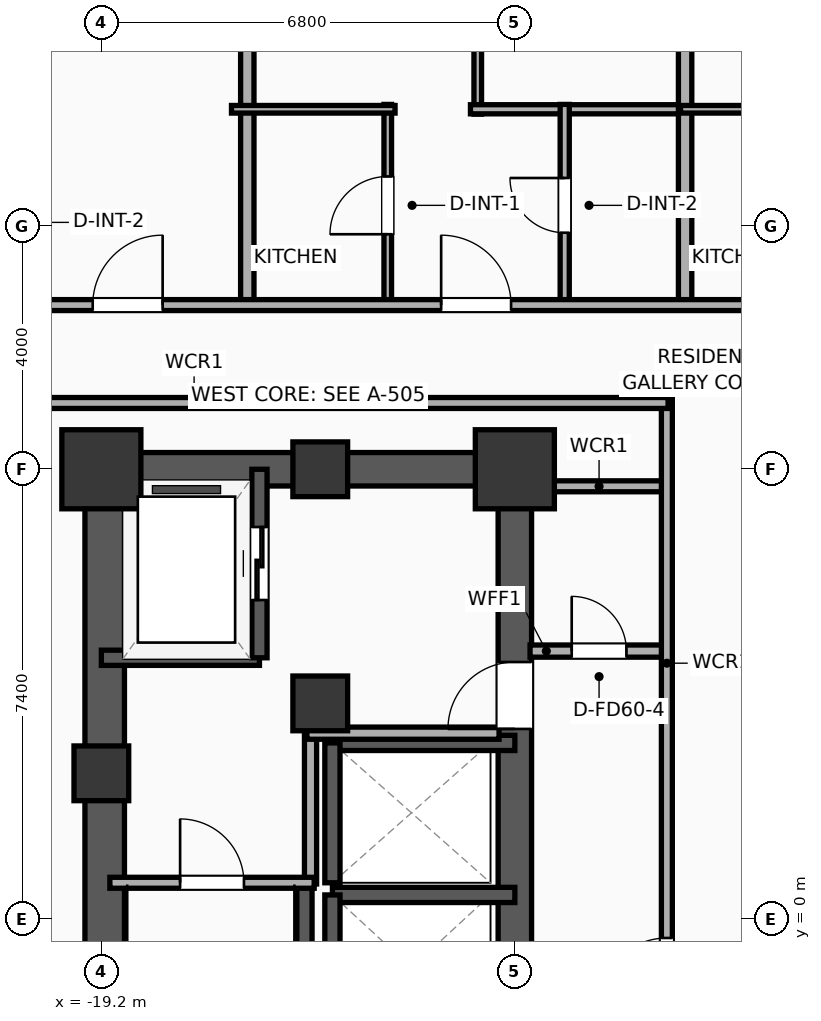
"""IFC4 building model, lengths in metres.
Left out: names, types, materials, properties, quantities, classifications, styles, units other than length and angle.
Written with IfcOpenShell. Run it as: python <this file> out.ifc"""

import sys

from ifc_helpers import new_model, si_unit, direction, frame, frame_2d, origin, origin_2d, place, context, subcontext, project, spatial, rectangle, extrude, element, fill, save


model = new_model("IFC4")
c1 = context("Model", 3, precision=1e-05, world=origin(), true_north=direction((0.0, 1.0)))
c2 = subcontext(c1, "Body", "Model", "MODEL_VIEW")
j1 = project(units=[si_unit("LENGTHUNIT", "METRE"), si_unit("PLANEANGLEUNIT", "RADIAN")], contexts=[c1])
p1 = place(None, origin())
s1 = spatial("IfcSite", under=j1, at=p1, CompositionType="ELEMENT")
p2 = place(p1, origin())
s2 = spatial("IfcBuilding", under=s1, at=p2, CompositionType="ELEMENT")
p3 = place(p2, frame((0.0, 0.0, 136.5)))
s3 = spatial("IfcBuildingStorey", under=s2, at=p3, CompositionType="ELEMENT", Elevation=136.5)
p4 = place(p3, frame((-19.2, 2.4, 0.0), z_axis=(0.0, 0.0, 1.0), x_axis=(1.0, 0.0, 0.0)))
e1 = element("IfcColumn", 1, at=p4, inside=s3, PredefinedType="COLUMN", context=c2, shape_type="SweptSolid", body=[
    extrude(rectangle(XDim=0.9, YDim=0.9, at=origin_2d()), origin(), (0.0, 0.0, 1.0), 3.9),
])
p5 = place(p3, frame((-19.2, 7.4, 0.0), z_axis=(0.0, 0.0, 1.0), x_axis=(1.0, 0.0, 0.0)))
e2 = element("IfcColumn", 2, at=p5, inside=s3, PredefinedType="COLUMN", context=c2, shape_type="SweptSolid", body=[
    extrude(rectangle(XDim=1.3, YDim=1.3, at=origin_2d()), origin(), (0.0, 0.0, 1.0), 3.9),
])
for number, where, z_axis, x_axis in (
    (3, (-15.6, 7.4, 0.0), (0.0, 0.0, 1.0), (1.0, 0.0, 0.0)),
    (4, (-15.6, 3.55, 0.0), (0.0, 0.0, 1.0), (1.0, 0.0, 0.0)),
):
    element("IfcColumn", number, at=place(p3, frame(where, z_axis=z_axis, x_axis=x_axis)), inside=s3, PredefinedType="COLUMN", context=c2, shape_type="SweptSolid", body=[
        extrude(rectangle(XDim=0.9, YDim=0.9, at=origin_2d()), origin(), (0.0, 0.0, 1.0), 3.9),
    ])
p6 = place(p3, frame((-12.4, 7.4, 0.0), z_axis=(0.0, 0.0, 1.0), x_axis=(1.0, 0.0, 0.0)))
e5 = element("IfcColumn", 5, at=p6, inside=s3, PredefinedType="COLUMN", context=c2, shape_type="SweptSolid", body=[
    extrude(rectangle(XDim=1.3, YDim=1.3, at=origin_2d()), origin(), (0.0, 0.0, 1.0), 3.9),
])
p7 = place(p3, frame((-19.475, 7.4, 0.0), z_axis=(0.0, 0.0, 1.0), x_axis=(1.0, 0.0, 0.0)))
e6 = element("IfcWall", 6, at=p7, inside=s3, PredefinedType="SHEAR", context=c2, shape_type="SweptSolid", body=[
    extrude(rectangle(XDim=7.35, YDim=0.55, at=frame_2d((3.675, 0.0))), origin(), (0.0, 0.0, 1.0), 3.5),
])
p8 = place(p3, frame((-19.145, -7.4, 0.0), z_axis=(0.0, 0.0, 1.0), x_axis=(0.0, 1.0, 0.0)))
e7 = element("IfcWall", 7, at=p8, inside=s3, PredefinedType="SHEAR", context=c2, shape_type="SweptSolid", body=[
    extrude(rectangle(XDim=14.8, YDim=0.65, at=frame_2d((7.4, 0.0))), origin(), (0.0, 0.0, 1.0), 3.5),
])
p9 = place(p3, frame((-12.4, -7.4, 0.0), z_axis=(0.0, 0.0, 1.0), x_axis=(0.0, 1.0, 0.0)))
e8 = element("IfcWall", 8, at=p9, inside=s3, PredefinedType="SHEAR", context=c2, shape_type="SweptSolid", body=[
    extrude(rectangle(XDim=14.8, YDim=0.55, at=frame_2d((7.4, 0.0))), origin(), (0.0, 0.0, 1.0), 3.5),
])
p10 = place(p9, frame((0.85, 0.0, 0.0)))
e9 = element("IfcOpeningElement", 9, at=p10, cuts=e8, PredefinedType="OPENING", context=c2, shape_type="SweptSolid", body=[
    extrude(rectangle(XDim=1.1, YDim=2.05, at=frame_2d((0.55, 1.025))), frame((0.0, 0.285, 0.0), z_axis=(0.0, -1.0, 0.0), x_axis=(1.0, 0.0, 0.0)), (0.0, 0.0, 1.0), 0.57),
])
p11 = place(p9, frame((3.45, 0.0, 0.0)))
e10 = element("IfcOpeningElement", 10, at=p11, cuts=e8, PredefinedType="OPENING", context=c2, shape_type="SweptSolid", body=[
    extrude(rectangle(XDim=1.1, YDim=2.05, at=frame_2d((0.55, 1.025))), frame((0.0, 0.285, 0.0), z_axis=(0.0, -1.0, 0.0), x_axis=(1.0, 0.0, 0.0)), (0.0, 0.0, 1.0), 0.57),
])
p12 = place(p9, frame((10.53, 0.0, 0.0)))
e11 = element("IfcOpeningElement", 11, at=p12, cuts=e8, PredefinedType="OPENING", context=c2, shape_type="SweptSolid", body=[
    extrude(rectangle(XDim=1.1, YDim=2.05, at=frame_2d((0.55, 1.025))), frame((0.0, 0.285, 0.0), z_axis=(0.0, -1.0, 0.0), x_axis=(1.0, 0.0, 0.0)), (0.0, 0.0, 1.0), 0.57),
])
p13 = place(p3, frame((-15.86, -7.085, 0.0), z_axis=(0.0, 0.0, 1.0), x_axis=(0.0, 1.0, 0.0)))
e12 = element("IfcWall", 12, at=p13, inside=s3, PredefinedType="SOLIDWALL", context=c2, shape_type="SweptSolid", body=[
    extrude(rectangle(XDim=7.685, YDim=0.25, at=frame_2d((3.843, 0.0))), origin(), (0.0, 0.0, 1.0), 3.5),
])
p14 = place(p3, frame((-19.2, 4.3, 0.0), z_axis=(0.0, 0.0, 1.0), x_axis=(1.0, 0.0, 0.0)))
e13 = element("IfcWall", 13, at=p14, inside=s3, PredefinedType="SOLIDWALL", context=c2, shape_type="SweptSolid", body=[
    extrude(rectangle(XDim=2.6, YDim=0.25, at=frame_2d((1.3, 0.0))), origin(), (0.0, 0.0, 1.0), 3.5),
])
p15 = place(p3, frame((-16.6, 4.3, 0.0), z_axis=(0.0, 0.0, 1.0), x_axis=(0.0, 1.0, 0.0)))
e14 = element("IfcWall", 14, at=p15, inside=s3, PredefinedType="SOLIDWALL", context=c2, shape_type="SweptSolid", body=[
    extrude(rectangle(XDim=3.1, YDim=0.25, at=frame_2d((1.55, 0.0))), origin(), (0.0, 0.0, 1.0), 3.5),
])
p16 = place(p15, frame((0.95, 0.0, 0.0)))
e15 = element("IfcOpeningElement", 15, at=p16, cuts=e14, PredefinedType="OPENING", context=c2, shape_type="SweptSolid", body=[
    extrude(rectangle(XDim=1.2, YDim=2.05, at=frame_2d((0.6, 1.025))), frame((0.0, 0.135, 0.0), z_axis=(0.0, -1.0, 0.0), x_axis=(1.0, 0.0, 0.0)), (0.0, 0.0, 1.0), 0.27),
])
p17 = place(p3, frame((-12.4, 0.4, 0.0), z_axis=(0.0, 0.0, 1.0), x_axis=(-1.0, 0.0, 0.0)))
e16 = element("IfcWall", 16, at=p17, inside=s3, PredefinedType="SOLIDWALL", context=c2, shape_type="SweptSolid", body=[
    extrude(rectangle(XDim=3.0, YDim=0.25, at=frame_2d((1.5, 0.0))), origin(), (0.0, 0.0, 1.0), 3.5),
])
p18 = place(p3, frame((-15.4, 0.4, 0.0), z_axis=(0.0, 0.0, 1.0), x_axis=(0.0, -1.0, 0.0)))
e17 = element("IfcWall", 17, at=p18, inside=s3, PredefinedType="SOLIDWALL", context=c2, shape_type="SweptSolid", body=[
    extrude(rectangle(XDim=2.4, YDim=0.25, at=frame_2d((1.2, 0.0))), origin(), (0.0, 0.0, 1.0), 3.5),
])
p19 = place(p3, frame((-12.4, 2.9, 0.0), z_axis=(0.0, 0.0, 1.0), x_axis=(-1.0, 0.0, 0.0)))
e18 = element("IfcWall", 18, at=p19, inside=s3, PredefinedType="SOLIDWALL", context=c2, shape_type="SweptSolid", body=[
    extrude(rectangle(XDim=3.0, YDim=0.25, at=frame_2d((1.5, 0.0))), origin(), (0.0, 0.0, 1.0), 3.5),
])
p20 = place(p3, frame((-15.4, 2.9, 0.0), z_axis=(0.0, 0.0, 1.0), x_axis=(0.0, -1.0, 0.0)))
e19 = element("IfcWall", 19, at=p20, inside=s3, PredefinedType="SOLIDWALL", context=c2, shape_type="SweptSolid", body=[
    extrude(rectangle(XDim=2.3, YDim=0.25, at=frame_2d((1.15, 0.0))), origin(), (0.0, 0.0, 1.0), 3.5),
])
p21 = place(p3, frame((-15.76, 0.58, 0.0), z_axis=(0.0, 0.0, 1.0), x_axis=(0.0, 1.0, 0.0)))
e20 = element("IfcWall", 20, at=p21, inside=s3, PredefinedType="PARTITIONING", context=c2, shape_type="SweptSolid", body=[
    extrude(rectangle(XDim=2.52, YDim=0.2, at=frame_2d((1.26, 0.0))), origin(), (0.0, 0.0, 1.0), 3.5),
])
p22 = place(p3, frame((-15.82, 3.06, 0.0), z_axis=(0.0, 0.0, 1.0), x_axis=(1.0, 0.0, 0.0)))
e21 = element("IfcWall", 21, at=p22, inside=s3, PredefinedType="PARTITIONING", context=c2, shape_type="SweptSolid", body=[
    extrude(rectangle(XDim=3.16, YDim=0.2, at=frame_2d((1.58, 0.0))), origin(), (0.0, 0.0, 1.0), 3.5),
])
p23 = place(p3, frame((-19.06, 0.6, 0.0), z_axis=(0.0, 0.0, 1.0), x_axis=(1.0, 0.0, 0.0)))
e22 = element("IfcWall", 22, at=p23, inside=s3, PredefinedType="PARTITIONING", context=c2, shape_type="SweptSolid", body=[
    extrude(rectangle(XDim=3.36, YDim=0.18, at=frame_2d((1.68, 0.0))), origin(), (0.0, 0.0, 1.0), 3.5),
])
p24 = place(p23, frame((1.155, 0.0, 0.0)))
e23 = element("IfcOpeningElement", 23, at=p24, cuts=e22, PredefinedType="OPENING", context=c2, shape_type="SweptSolid", body=[
    extrude(rectangle(XDim=1.05, YDim=2.05, at=frame_2d((0.525, 1.025))), frame((0.0, 0.1, 0.0), z_axis=(0.0, -1.0, 0.0), x_axis=(1.0, 0.0, 0.0)), (0.0, 0.0, 1.0), 0.2),
])
p25 = place(p3, frame((-12.15, 4.41, 0.0), z_axis=(0.0, 0.0, 1.0), x_axis=(1.0, 0.0, 0.0)))
e24 = element("IfcWall", 24, at=p25, inside=s3, PredefinedType="PARTITIONING", context=c2, shape_type="SweptSolid", body=[
    extrude(rectangle(XDim=2.27, YDim=0.2, at=frame_2d((1.135, 0.0))), origin(), (0.0, 0.0, 1.0), 3.5),
])
p26 = place(p25, frame((0.685, 0.0, 0.0)))
e25 = element("IfcOpeningElement", 25, at=p26, cuts=e24, PredefinedType="OPENING", context=c2, shape_type="SweptSolid", body=[
    extrude(rectangle(XDim=0.9, YDim=2.05, at=frame_2d((0.45, 1.025))), frame((0.0, 0.11, 0.0), z_axis=(0.0, -1.0, 0.0), x_axis=(1.0, 0.0, 0.0)), (0.0, 0.0, 1.0), 0.22),
])
p27 = place(p3, frame((-12.15, 7.12, 0.0), z_axis=(0.0, 0.0, 1.0), x_axis=(1.0, 0.0, 0.0)))
e26 = element("IfcWall", 26, at=p27, inside=s3, PredefinedType="PARTITIONING", context=c2, shape_type="SweptSolid", body=[
    extrude(rectangle(XDim=2.27, YDim=0.18, at=frame_2d((1.135, 0.0))), origin(), (0.0, 0.0, 1.0), 2.54),
])
p28 = place(p3, frame((-9.9, -8.58, 0.0), z_axis=(0.0, 0.0, 1.0), x_axis=(0.0, 1.0, 0.0)))
e27 = element("IfcWall", 27, at=p28, inside=s3, PredefinedType="PARTITIONING", context=c2, shape_type="SweptSolid", body=[
    extrude(rectangle(XDim=17.16, YDim=0.18, at=frame_2d((8.58, 0.0))), origin(), (0.0, 0.0, 1.0), 3.5),
])
p29 = place(p28, frame((7.172, 0.0, 0.0)))
e28 = element("IfcOpeningElement", 28, at=p29, cuts=e27, PredefinedType="OPENING", context=c2, shape_type="SweptSolid", body=[
    extrude(rectangle(XDim=1.1, YDim=2.05, at=frame_2d((0.55, 1.025))), frame((0.0, 0.1, 0.0), z_axis=(0.0, -1.0, 0.0), x_axis=(1.0, 0.0, 0.0)), (0.0, 0.0, 1.0), 0.2),
])
p30 = place(p3, frame((-29.21, 8.49, 0.0), z_axis=(0.0, 0.0, 1.0), x_axis=(1.0, 0.0, 0.0)))
e29 = element("IfcWall", 29, at=p30, inside=s3, PredefinedType="PARTITIONING", context=c2, shape_type="SweptSolid", body=[
    extrude(rectangle(XDim=19.33, YDim=0.18, at=frame_2d((9.665, 0.0))), origin(), (0.0, 0.0, 1.0), 2.39),
])
p31 = place(p30, frame((2.44, 0.0, 0.0)))
e30 = element("IfcOpeningElement", 30, at=p31, cuts=e29, PredefinedType="OPENING", context=c2, shape_type="SweptSolid", body=[
    extrude(rectangle(XDim=1.15, YDim=2.05, at=frame_2d((0.575, 1.025))), frame((0.0, 0.1, 0.0), z_axis=(0.0, -1.0, 0.0), x_axis=(1.0, 0.0, 0.0)), (0.0, 0.0, 1.0), 0.2),
])
p32 = place(p3, frame((-16.8, 10.02, 0.0), z_axis=(0.0, 0.0, 1.0), x_axis=(0.0, 1.0, 0.0)))
e31 = element("IfcWall", 31, at=p32, inside=s3, PredefinedType="PARTITIONING", context=c2, shape_type="SweptSolid", body=[
    extrude(rectangle(XDim=11.59, YDim=0.22, at=frame_2d((5.795, 0.0))), origin(), (0.0, 0.0, 1.0), 3.5),
])
p33 = place(p3, frame((-13.01, 13.24, 0.0), z_axis=(0.0, 0.0, 1.0), x_axis=(0.0, 1.0, 0.0)))
e32 = element("IfcWall", 32, at=p33, inside=s3, PredefinedType="PARTITIONING", context=c2, shape_type="SweptSolid", body=[
    extrude(rectangle(XDim=8.52, YDim=0.125, at=frame_2d((4.26, 0.0))), origin(), (0.0, 0.0, 1.0), 3.5),
])
p34 = place(p33, frame((1.595, 0.0, 0.0)))
e33 = element("IfcOpeningElement", 33, at=p34, cuts=e32, PredefinedType="OPENING", context=c2, shape_type="SweptSolid", body=[
    extrude(rectangle(XDim=0.9, YDim=2.05, at=frame_2d((0.45, 1.025))), frame((0.0, 0.073, 0.0), z_axis=(0.0, -1.0, 0.0), x_axis=(1.0, 0.0, 0.0)), (0.0, 0.0, 1.0), 0.145),
])
p35 = place(p3, frame((-13.13, 13.32, 0.0), z_axis=(0.0, 0.0, 1.0), x_axis=(1.0, 0.0, 0.0)))
e34 = element("IfcWall", 34, at=p35, inside=s3, PredefinedType="PLUMBINGWALL", context=c2, shape_type="SweptSolid", body=[
    extrude(rectangle(XDim=3.605, YDim=0.15, at=frame_2d((1.802, 0.0))), origin(), (0.0, 0.0, 1.0), 3.5),
])
p36 = place(p3, frame((-14.49, 10.08, 0.0), z_axis=(0.0, 0.0, 1.0), x_axis=(0.0, 1.0, 0.0)))
e35 = element("IfcWall", 35, at=p36, inside=s3, PredefinedType="PARTITIONING", context=c2, shape_type="SweptSolid", body=[
    extrude(rectangle(XDim=3.32, YDim=0.125, at=frame_2d((1.66, 0.0))), origin(), (0.0, 0.0, 1.0), 3.5),
])
p37 = place(p36, frame((1.185, 0.0, 0.0)))
e36 = element("IfcOpeningElement", 36, at=p37, cuts=e35, PredefinedType="OPENING", context=c2, shape_type="SweptSolid", body=[
    extrude(rectangle(XDim=0.95, YDim=2.05, at=frame_2d((0.475, 1.025))), frame((0.0, 0.073, 0.0), z_axis=(0.0, -1.0, 0.0), x_axis=(1.0, 0.0, 0.0)), (0.0, 0.0, 1.0), 0.145),
])
p38 = place(p3, frame((-17.06, 13.32, 0.0), z_axis=(0.0, 0.0, 1.0), x_axis=(1.0, 0.0, 0.0)))
e37 = element("IfcWall", 37, at=p38, inside=s3, PredefinedType="PARTITIONING", context=c2, shape_type="SweptSolid", body=[
    extrude(rectangle(XDim=2.69, YDim=0.125, at=frame_2d((1.345, 0.0))), origin(), (0.0, 0.0, 1.0), 3.5),
])
p39 = place(p3, frame((-11.58, 10.08, 0.0), z_axis=(0.0, 0.0, 1.0), x_axis=(0.0, 1.0, 0.0)))
e38 = element("IfcWall", 38, at=p39, inside=s3, PredefinedType="PLUMBINGWALL", context=c2, shape_type="SweptSolid", body=[
    extrude(rectangle(XDim=3.32, YDim=0.15, at=frame_2d((1.66, 0.0))), origin(), (0.0, 0.0, 1.0), 2.39),
])
p40 = place(p39, frame((1.21, 0.0, 0.0)))
e39 = element("IfcOpeningElement", 39, at=p40, cuts=e38, PredefinedType="OPENING", context=c2, shape_type="SweptSolid", body=[
    extrude(rectangle(XDim=0.9, YDim=2.05, at=frame_2d((0.45, 1.025))), frame((0.0, 0.085, 0.0), z_axis=(0.0, -1.0, 0.0), x_axis=(1.0, 0.0, 0.0)), (0.0, 0.0, 1.0), 0.17),
])
p41 = place(p3, frame((-9.6, 10.02, 0.0), z_axis=(0.0, 0.0, 1.0), x_axis=(0.0, 1.0, 0.0)))
e40 = element("IfcWall", 40, at=p41, inside=s3, PredefinedType="PARTITIONING", context=c2, shape_type="SweptSolid", body=[
    extrude(rectangle(XDim=11.59, YDim=0.22, at=frame_2d((5.795, 0.0))), origin(), (0.0, 0.0, 1.0), 2.39),
])
p42 = place(p3, frame((-9.675, 13.32, 0.0), z_axis=(0.0, 0.0, 1.0), x_axis=(1.0, 0.0, 0.0)))
e41 = element("IfcWall", 41, at=p42, inside=s3, PredefinedType="PARTITIONING", context=c2, shape_type="SweptSolid", body=[
    extrude(rectangle(XDim=2.505, YDim=0.125, at=frame_2d((1.252, 0.0))), origin(), (0.0, 0.0, 1.0), 3.5),
])
p43 = place(p3, frame((-29.21, 10.1, 0.0), z_axis=(0.0, 0.0, 1.0), x_axis=(1.0, 0.0, 0.0)))
e42 = element("IfcWall", 42, at=p43, inside=s3, PredefinedType="PARTITIONING", context=c2, shape_type="SweptSolid", body=[
    extrude(rectangle(XDim=62.42, YDim=0.18, at=frame_2d((31.21, 0.0))), origin(), (0.0, 0.0, 1.0), 2.39),
])
p44 = place(p43, frame((2.74, 0.0, 0.0)))
e43 = element("IfcOpeningElement", 43, at=p44, cuts=e42, PredefinedType="OPENING", context=c2, shape_type="SweptSolid", body=[
    extrude(rectangle(XDim=0.9, YDim=2.05, at=frame_2d((0.45, 1.025))), frame((0.0, 0.1, 0.0), z_axis=(0.0, -1.0, 0.0), x_axis=(1.0, 0.0, 0.0)), (0.0, 0.0, 1.0), 0.2),
])
p45 = place(p43, frame((9.868, 0.0, 0.0)))
e44 = element("IfcOpeningElement", 44, at=p45, cuts=e42, PredefinedType="OPENING", context=c2, shape_type="SweptSolid", body=[
    extrude(rectangle(XDim=1.15, YDim=2.05, at=frame_2d((0.575, 1.025))), frame((0.0, 0.1, 0.0), z_axis=(0.0, -1.0, 0.0), x_axis=(1.0, 0.0, 0.0)), (0.0, 0.0, 1.0), 0.2),
])
p46 = place(p43, frame((15.598, 0.0, 0.0)))
e45 = element("IfcOpeningElement", 45, at=p46, cuts=e42, PredefinedType="OPENING", context=c2, shape_type="SweptSolid", body=[
    extrude(rectangle(XDim=1.15, YDim=2.05, at=frame_2d((0.575, 1.025))), frame((0.0, 0.1, 0.0), z_axis=(0.0, -1.0, 0.0), x_axis=(1.0, 0.0, 0.0)), (0.0, 0.0, 1.0), 0.2),
])
p47 = place(p43, frame((22.801, 0.0, 0.0)))
e46 = element("IfcOpeningElement", 46, at=p47, cuts=e42, PredefinedType="OPENING", context=c2, shape_type="SweptSolid", body=[
    extrude(rectangle(XDim=1.15, YDim=2.05, at=frame_2d((0.575, 1.025))), frame((0.0, 0.1, 0.0), z_axis=(0.0, -1.0, 0.0), x_axis=(1.0, 0.0, 0.0)), (0.0, 0.0, 1.0), 0.2),
])
p48 = place(p43, frame((29.998, 0.0, 0.0)))
e47 = element("IfcOpeningElement", 47, at=p48, cuts=e42, PredefinedType="OPENING", context=c2, shape_type="SweptSolid", body=[
    extrude(rectangle(XDim=1.15, YDim=2.05, at=frame_2d((0.575, 1.025))), frame((0.0, 0.1, 0.0), z_axis=(0.0, -1.0, 0.0), x_axis=(1.0, 0.0, 0.0)), (0.0, 0.0, 1.0), 0.2),
])
p49 = place(p43, frame((37.202, 0.0, 0.0)))
e48 = element("IfcOpeningElement", 48, at=p49, cuts=e42, PredefinedType="OPENING", context=c2, shape_type="SweptSolid", body=[
    extrude(rectangle(XDim=1.15, YDim=2.05, at=frame_2d((0.575, 1.025))), frame((0.0, 0.1, 0.0), z_axis=(0.0, -1.0, 0.0), x_axis=(1.0, 0.0, 0.0)), (0.0, 0.0, 1.0), 0.2),
])
p50 = place(p43, frame((44.399, 0.0, 0.0)))
e49 = element("IfcOpeningElement", 49, at=p50, cuts=e42, PredefinedType="OPENING", context=c2, shape_type="SweptSolid", body=[
    extrude(rectangle(XDim=1.15, YDim=2.05, at=frame_2d((0.575, 1.025))), frame((0.0, 0.1, 0.0), z_axis=(0.0, -1.0, 0.0), x_axis=(1.0, 0.0, 0.0)), (0.0, 0.0, 1.0), 0.2),
])
p51 = place(p43, frame((51.602, 0.0, 0.0)))
e50 = element("IfcOpeningElement", 50, at=p51, cuts=e42, PredefinedType="OPENING", context=c2, shape_type="SweptSolid", body=[
    extrude(rectangle(XDim=1.15, YDim=2.05, at=frame_2d((0.575, 1.025))), frame((0.0, 0.1, 0.0), z_axis=(0.0, -1.0, 0.0), x_axis=(1.0, 0.0, 0.0)), (0.0, 0.0, 1.0), 0.2),
])
p52 = place(p43, frame((58.762, 0.0, 0.0)))
e51 = element("IfcOpeningElement", 51, at=p52, cuts=e42, PredefinedType="OPENING", context=c2, shape_type="SweptSolid", body=[
    extrude(rectangle(XDim=0.9, YDim=2.05, at=frame_2d((0.45, 1.025))), frame((0.0, 0.1, 0.0), z_axis=(0.0, -1.0, 0.0), x_axis=(1.0, 0.0, 0.0)), (0.0, 0.0, 1.0), 0.2),
])
p53 = place(p16, origin())
e52 = element("IfcDoor", 52, at=p53, inside=s3, OperationType="SLIDING_TO_LEFT", PredefinedType="DOOR", context=c2, shape_type="SweptSolid", body=[
    extrude(rectangle(XDim=1.2, YDim=2.05, at=frame_2d((0.6, 1.025))), frame((0.0, 0.025, 0.0), z_axis=(0.0, -1.0, 0.0), x_axis=(1.0, 0.0, 0.0)), (0.0, 0.0, 1.0), 0.05),
])
fill(e15, e52)
p54 = place(p24, origin())
e53 = element("IfcDoor", 53, at=p54, inside=s3, OperationType="SINGLE_SWING_LEFT", PredefinedType="DOOR", context=c2, shape_type="SweptSolid", body=[
    extrude(rectangle(XDim=1.05, YDim=2.05, at=frame_2d((0.525, 1.025))), frame((0.0, 0.025, 0.0), z_axis=(0.0, -1.0, 0.0), x_axis=(1.0, 0.0, 0.0)), (0.0, 0.0, 1.0), 0.05),
])
fill(e23, e53)
p55 = place(p26, origin())
e54 = element("IfcDoor", 54, at=p55, inside=s3, OperationType="SINGLE_SWING_LEFT", PredefinedType="DOOR", context=c2, shape_type="SweptSolid", body=[
    extrude(rectangle(XDim=0.9, YDim=2.05, at=frame_2d((0.45, 1.025))), frame((0.0, 0.025, 0.0), z_axis=(0.0, -1.0, 0.0), x_axis=(1.0, 0.0, 0.0)), (0.0, 0.0, 1.0), 0.05),
])
fill(e25, e54)
p56 = place(p29, origin())
e55 = element("IfcDoor", 55, at=p56, inside=s3, OperationType="SINGLE_SWING_LEFT", PredefinedType="DOOR", context=c2, shape_type="SweptSolid", body=[
    extrude(rectangle(XDim=1.1, YDim=2.05, at=frame_2d((0.55, 1.025))), frame((0.0, 0.025, 0.0), z_axis=(0.0, -1.0, 0.0), x_axis=(1.0, 0.0, 0.0)), (0.0, 0.0, 1.0), 0.05),
])
fill(e28, e55)
p57 = place(p37, origin())
e56 = element("IfcDoor", 56, at=p57, inside=s3, OperationType="SINGLE_SWING_LEFT", PredefinedType="DOOR", context=c2, shape_type="SweptSolid", body=[
    extrude(rectangle(XDim=0.95, YDim=2.05, at=frame_2d((0.475, 1.025))), frame((0.0, 0.025, 0.0), z_axis=(0.0, -1.0, 0.0), x_axis=(1.0, 0.0, 0.0)), (0.0, 0.0, 1.0), 0.05),
])
fill(e36, e56)
p58 = place(p40, origin())
e57 = element("IfcDoor", 57, at=p58, inside=s3, OperationType="SINGLE_SWING_RIGHT", PredefinedType="DOOR", context=c2, shape_type="SweptSolid", body=[
    extrude(rectangle(XDim=0.9, YDim=2.05, at=frame_2d((0.45, 1.025))), frame((0.0, 0.025, 0.0), z_axis=(0.0, -1.0, 0.0), x_axis=(1.0, 0.0, 0.0)), (0.0, 0.0, 1.0), 0.05),
])
fill(e39, e57)
p59 = place(p45, origin())
e58 = element("IfcDoor", 58, at=p59, inside=s3, OperationType="SINGLE_SWING_RIGHT", PredefinedType="DOOR", context=c2, shape_type="SweptSolid", body=[
    extrude(rectangle(XDim=1.15, YDim=2.05, at=frame_2d((0.575, 1.025))), frame((0.0, 0.025, 0.0), z_axis=(0.0, -1.0, 0.0), x_axis=(1.0, 0.0, 0.0)), (0.0, 0.0, 1.0), 0.05),
])
fill(e44, e58)
p60 = place(p46, origin())
e59 = element("IfcDoor", 59, at=p60, inside=s3, OperationType="SINGLE_SWING_LEFT", PredefinedType="DOOR", context=c2, shape_type="SweptSolid", body=[
    extrude(rectangle(XDim=1.15, YDim=2.05, at=frame_2d((0.575, 1.025))), frame((0.0, 0.025, 0.0), z_axis=(0.0, -1.0, 0.0), x_axis=(1.0, 0.0, 0.0)), (0.0, 0.0, 1.0), 0.05),
])
fill(e45, e59)
p61 = place(p12, origin())
e60 = element("IfcDoor", 60, at=p61, inside=s3, OperationType="SINGLE_SWING_LEFT", PredefinedType="DOOR", context=c2, shape_type="SweptSolid", body=[
    extrude(rectangle(XDim=1.1, YDim=2.05, at=frame_2d((0.55, 1.025))), frame((0.0, 0.025, 0.0), z_axis=(0.0, -1.0, 0.0), x_axis=(1.0, 0.0, 0.0)), (0.0, 0.0, 1.0), 0.05),
])
fill(e11, e60)
save(model, sys.argv[1])
